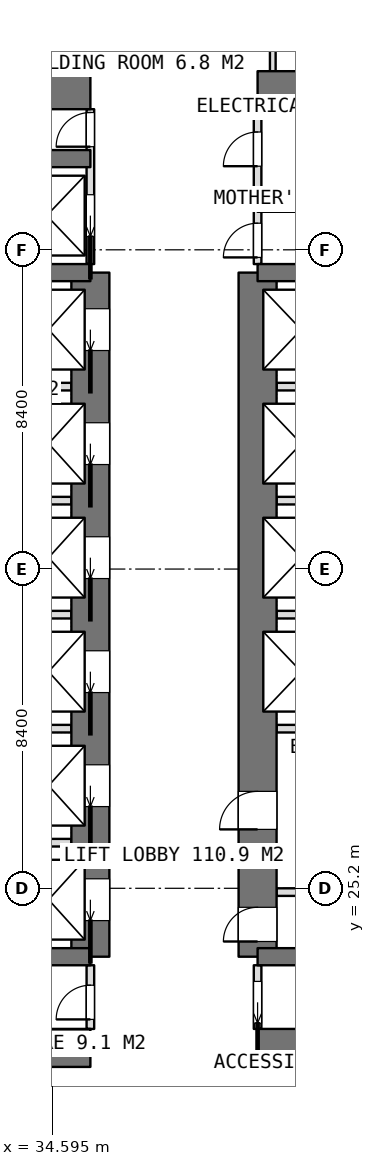
"""IFC4 building model, lengths in metres.
Left out: names, types, materials, properties, quantities, classifications, styles, units other than length and angle.
Written with IfcOpenShell. Run it as: python <this file> out.ifc"""

import sys

from ifc_helpers import new_model, si_unit, direction, frame, frame_2d, origin, place, context, subcontext, project, spatial, rectangle, extrude, element, fill, save


model = new_model("IFC4")
c1 = context("Model", 3, precision=1e-05, world=origin(), true_north=direction((0.0, 1.0)))
c2 = subcontext(c1, "Body", "Model", "MODEL_VIEW")
j1 = project(units=[si_unit("LENGTHUNIT", "METRE"), si_unit("PLANEANGLEUNIT", "RADIAN")], contexts=[c1])
p1 = place(None, origin())
s1 = spatial("IfcSite", under=j1, at=p1, CompositionType="ELEMENT")
p2 = place(p1, origin())
s2 = spatial("IfcBuilding", under=s1, at=p2, CompositionType="ELEMENT")
p3 = place(p2, frame((0.0, 0.0, 151.55)))
s3 = spatial("IfcBuildingStorey", under=s2, at=p3, CompositionType="ELEMENT", Elevation=151.55)
p4 = place(p3, frame((25.2, 21.0, 0.0), z_axis=(0.0, 0.0, 1.0), x_axis=(1.0, 0.0, 0.0)))
e1 = element("IfcWall", 1, at=p4, inside=s3, PredefinedType="SHEAR", context=c2, shape_type="SweptSolid", body=[
    extrude(rectangle(XDim=10.4, YDim=1.0, at=frame_2d((5.2, 0.0))), origin(), (0.0, 0.0, 1.0), 3.75),
])
p5 = place(p3, frame((40.0, 21.0, 0.0), z_axis=(0.0, 0.0, 1.0), x_axis=(1.0, 0.0, 0.0)))
e2 = element("IfcWall", 2, at=p5, inside=s3, PredefinedType="SHEAR", context=c2, shape_type="SweptSolid", body=[
    extrude(rectangle(XDim=10.4, YDim=1.0, at=frame_2d((5.2, 0.0))), origin(), (0.0, 0.0, 1.0), 3.75),
])
p6 = place(p3, frame((25.2, 46.2, 0.0), z_axis=(0.0, 0.0, 1.0), x_axis=(1.0, 0.0, 0.0)))
e3 = element("IfcWall", 3, at=p6, inside=s3, PredefinedType="SHEAR", context=c2, shape_type="SweptSolid", body=[
    extrude(rectangle(XDim=10.4, YDim=1.0, at=frame_2d((5.2, 0.0))), origin(), (0.0, 0.0, 1.0), 3.75),
])
p7 = place(p3, frame((40.0, 46.2, 0.0), z_axis=(0.0, 0.0, 1.0), x_axis=(1.0, 0.0, 0.0)))
e4 = element("IfcWall", 4, at=p7, inside=s3, PredefinedType="SHEAR", context=c2, shape_type="SweptSolid", body=[
    extrude(rectangle(XDim=10.4, YDim=1.0, at=frame_2d((5.2, 0.0))), origin(), (0.0, 0.0, 1.0), 3.75),
])
p8 = place(p3, frame((35.6, 23.4, 0.0), z_axis=(0.0, 0.0, 1.0), x_axis=(0.0, 1.0, 0.0)))
e5 = element("IfcWall", 5, at=p8, inside=s3, PredefinedType="SHEAR", context=c2, shape_type="SweptSolid", body=[
    extrude(rectangle(XDim=18.0, YDim=1.0, at=frame_2d((9.0, 0.0))), origin(), (0.0, 0.0, 1.0), 3.75),
])
p9 = place(p8, frame((0.95, 0.0, 0.0)))
e6 = element("IfcOpeningElement", 6, at=p9, cuts=e5, PredefinedType="OPENING", context=c2, shape_type="SweptSolid", body=[
    extrude(rectangle(XDim=1.1, YDim=2.1, at=frame_2d((0.55, 1.05))), frame((0.0, 0.51, 0.0), z_axis=(0.0, -1.0, 0.0), x_axis=(1.0, 0.0, 0.0)), (0.0, 0.0, 1.0), 1.02),
])
p10 = place(p8, frame((3.95, 0.0, 0.0)))
e7 = element("IfcOpeningElement", 7, at=p10, cuts=e5, PredefinedType="OPENING", context=c2, shape_type="SweptSolid", body=[
    extrude(rectangle(XDim=1.1, YDim=2.1, at=frame_2d((0.55, 1.05))), frame((0.0, 0.51, 0.0), z_axis=(0.0, -1.0, 0.0), x_axis=(1.0, 0.0, 0.0)), (0.0, 0.0, 1.0), 1.02),
])
p11 = place(p8, frame((6.95, 0.0, 0.0)))
e8 = element("IfcOpeningElement", 8, at=p11, cuts=e5, PredefinedType="OPENING", context=c2, shape_type="SweptSolid", body=[
    extrude(rectangle(XDim=1.1, YDim=2.1, at=frame_2d((0.55, 1.05))), frame((0.0, 0.51, 0.0), z_axis=(0.0, -1.0, 0.0), x_axis=(1.0, 0.0, 0.0)), (0.0, 0.0, 1.0), 1.02),
])
p12 = place(p8, frame((9.95, 0.0, 0.0)))
e9 = element("IfcOpeningElement", 9, at=p12, cuts=e5, PredefinedType="OPENING", context=c2, shape_type="SweptSolid", body=[
    extrude(rectangle(XDim=1.1, YDim=2.1, at=frame_2d((0.55, 1.05))), frame((0.0, 0.51, 0.0), z_axis=(0.0, -1.0, 0.0), x_axis=(1.0, 0.0, 0.0)), (0.0, 0.0, 1.0), 1.02),
])
p13 = place(p8, frame((12.95, 0.0, 0.0)))
e10 = element("IfcOpeningElement", 10, at=p13, cuts=e5, PredefinedType="OPENING", context=c2, shape_type="SweptSolid", body=[
    extrude(rectangle(XDim=1.1, YDim=2.1, at=frame_2d((0.55, 1.05))), frame((0.0, 0.51, 0.0), z_axis=(0.0, -1.0, 0.0), x_axis=(1.0, 0.0, 0.0)), (0.0, 0.0, 1.0), 1.02),
])
p14 = place(p8, frame((15.95, 0.0, 0.0)))
e11 = element("IfcOpeningElement", 11, at=p14, cuts=e5, PredefinedType="OPENING", context=c2, shape_type="SweptSolid", body=[
    extrude(rectangle(XDim=1.1, YDim=2.1, at=frame_2d((0.55, 1.05))), frame((0.0, 0.51, 0.0), z_axis=(0.0, -1.0, 0.0), x_axis=(1.0, 0.0, 0.0)), (0.0, 0.0, 1.0), 1.02),
])
p15 = place(p3, frame((40.0, 23.4, 0.0), z_axis=(0.0, 0.0, 1.0), x_axis=(0.0, 1.0, 0.0)))
e12 = element("IfcWall", 12, at=p15, inside=s3, PredefinedType="SHEAR", context=c2, shape_type="SweptSolid", body=[
    extrude(rectangle(XDim=18.0, YDim=1.0, at=frame_2d((9.0, 0.0))), origin(), (0.0, 0.0, 1.0), 3.75),
])
p16 = place(p15, frame((0.4, 0.0, 0.0)))
e13 = element("IfcOpeningElement", 13, at=p16, cuts=e12, PredefinedType="OPENING", context=c2, shape_type="SweptSolid", body=[
    extrude(rectangle(XDim=0.9, YDim=2.1, at=frame_2d((0.45, 1.05))), frame((0.0, 0.51, 0.0), z_axis=(0.0, -1.0, 0.0), x_axis=(1.0, 0.0, 0.0)), (0.0, 0.0, 1.0), 1.02),
])
p17 = place(p15, frame((3.35, 0.0, 0.0)))
e14 = element("IfcOpeningElement", 14, at=p17, cuts=e12, PredefinedType="OPENING", context=c2, shape_type="SweptSolid", body=[
    extrude(rectangle(XDim=1.0, YDim=2.1, at=frame_2d((0.5, 1.05))), frame((0.0, 0.51, 0.0), z_axis=(0.0, -1.0, 0.0), x_axis=(1.0, 0.0, 0.0)), (0.0, 0.0, 1.0), 1.02),
])
for number, where, z_axis, x_axis in (
    (15, (31.8, 23.4, 0.0), (0.0, 0.0, 1.0), (1.0, 0.0, 0.0)),
    (16, (31.8, 41.4, 0.0), (0.0, 0.0, 1.0), (1.0, 0.0, 0.0)),
    (17, (31.8, 44.4, 0.0), (0.0, 0.0, 1.0), (1.0, 0.0, 0.0)),
    (18, (40.0, 23.4, 0.0), (0.0, 0.0, 1.0), (1.0, 0.0, 0.0)),
    (19, (40.0, 41.4, 0.0), (0.0, 0.0, 1.0), (1.0, 0.0, 0.0)),
):
    element("IfcWall", number, at=place(p3, frame(where, z_axis=z_axis, x_axis=x_axis)), inside=s3, PredefinedType="SHEAR", context=c2, shape_type="SweptSolid", body=[
        extrude(rectangle(XDim=3.8, YDim=0.45, at=frame_2d((1.9, 0.0))), origin(), (0.0, 0.0, 1.0), 3.75),
    ])
for number, where, z_axis, x_axis in (
    (20, (32.025, 26.4, 0.0), (0.0, 0.0, 1.0), (1.0, 0.0, 0.0)),
    (21, (32.025, 29.4, 0.0), (0.0, 0.0, 1.0), (1.0, 0.0, 0.0)),
    (22, (32.025, 32.4, 0.0), (0.0, 0.0, 1.0), (1.0, 0.0, 0.0)),
    (23, (32.025, 35.4, 0.0), (0.0, 0.0, 1.0), (1.0, 0.0, 0.0)),
    (24, (32.025, 38.4, 0.0), (0.0, 0.0, 1.0), (1.0, 0.0, 0.0)),
):
    element("IfcWall", number, at=place(p3, frame(where, z_axis=z_axis, x_axis=x_axis)), inside=s3, PredefinedType="PARTITIONING", context=c2, shape_type="SweptSolid", body=[
        extrude(rectangle(XDim=3.075, YDim=0.2, at=frame_2d((1.538, 0.0))), origin(), (0.0, 0.0, 1.0), 3.5),
    ])
for number, where, z_axis, x_axis in (
    (25, (40.5, 29.4, 0.0), (0.0, 0.0, 1.0), (1.0, 0.0, 0.0)),
    (26, (40.5, 32.4, 0.0), (0.0, 0.0, 1.0), (1.0, 0.0, 0.0)),
    (27, (40.5, 35.4, 0.0), (0.0, 0.0, 1.0), (1.0, 0.0, 0.0)),
    (28, (40.5, 38.4, 0.0), (0.0, 0.0, 1.0), (1.0, 0.0, 0.0)),
):
    element("IfcWall", number, at=place(p3, frame(where, z_axis=z_axis, x_axis=x_axis)), inside=s3, PredefinedType="PARTITIONING", context=c2, shape_type="SweptSolid", body=[
        extrude(rectangle(XDim=3.075, YDim=0.2, at=frame_2d((1.538, 0.0))), origin(), (0.0, 0.0, 1.0), 3.5),
    ])
p18 = place(p3, frame((40.0, 21.5, 0.0), z_axis=(0.0, 0.0, 1.0), x_axis=(0.0, 1.0, 0.0)))
e29 = element("IfcWall", 29, at=p18, inside=s3, PredefinedType="PARTITIONING", context=c2, shape_type="SweptSolid", body=[
    extrude(rectangle(XDim=1.675, YDim=0.2, at=frame_2d((0.837, 0.0))), origin(), (0.0, 0.0, 1.0), 3.5),
])
p19 = place(p18, frame((0.15, 0.0, 0.0)))
e30 = element("IfcOpeningElement", 30, at=p19, cuts=e29, PredefinedType="OPENING", context=c2, shape_type="SweptSolid", body=[
    extrude(rectangle(XDim=1.1, YDim=2.1, at=frame_2d((0.55, 1.05))), frame((0.0, 0.11, 0.0), z_axis=(0.0, -1.0, 0.0), x_axis=(1.0, 0.0, 0.0)), (0.0, 0.0, 1.0), 0.22),
])
p20 = place(p3, frame((40.0, 41.625, 0.0), z_axis=(0.0, 0.0, 1.0), x_axis=(0.0, 1.0, 0.0)))
e31 = element("IfcWall", 31, at=p20, inside=s3, PredefinedType="PARTITIONING", context=c2, shape_type="SweptSolid", body=[
    extrude(rectangle(XDim=4.075, YDim=0.2, at=frame_2d((2.038, 0.0))), origin(), (0.0, 0.0, 1.0), 3.5),
])
p21 = place(p20, frame((2.575, 0.0, 0.0)))
e32 = element("IfcOpeningElement", 32, at=p21, cuts=e31, PredefinedType="OPENING", context=c2, shape_type="SweptSolid", body=[
    extrude(rectangle(XDim=0.9, YDim=2.1, at=frame_2d((0.45, 1.05))), frame((0.0, 0.11, 0.0), z_axis=(0.0, -1.0, 0.0), x_axis=(1.0, 0.0, 0.0)), (0.0, 0.0, 1.0), 0.22),
])
p22 = place(p20, frame((0.175, 0.0, 0.0)))
e33 = element("IfcOpeningElement", 33, at=p22, cuts=e31, PredefinedType="OPENING", context=c2, shape_type="SweptSolid", body=[
    extrude(rectangle(XDim=0.9, YDim=2.1, at=frame_2d((0.45, 1.05))), frame((0.0, 0.11, 0.0), z_axis=(0.0, -1.0, 0.0), x_axis=(1.0, 0.0, 0.0)), (0.0, 0.0, 1.0), 0.22),
])
p23 = place(p3, frame((35.6, 41.625, 0.0), z_axis=(0.0, 0.0, 1.0), x_axis=(0.0, 1.0, 0.0)))
e34 = element("IfcWall", 34, at=p23, inside=s3, PredefinedType="PARTITIONING", context=c2, shape_type="SweptSolid", body=[
    extrude(rectangle(XDim=4.075, YDim=0.2, at=frame_2d((2.038, 0.0))), origin(), (0.0, 0.0, 1.0), 3.5),
])
p24 = place(p23, frame((3.088, 0.0, 0.0)))
e35 = element("IfcOpeningElement", 35, at=p24, cuts=e34, PredefinedType="OPENING", context=c2, shape_type="SweptSolid", body=[
    extrude(rectangle(XDim=0.9, YDim=2.1, at=frame_2d((0.45, 1.05))), frame((0.0, 0.11, 0.0), z_axis=(0.0, -1.0, 0.0), x_axis=(1.0, 0.0, 0.0)), (0.0, 0.0, 1.0), 0.22),
])
p25 = place(p23, frame((0.725, 0.0, 0.0)))
e36 = element("IfcOpeningElement", 36, at=p25, cuts=e34, PredefinedType="OPENING", context=c2, shape_type="SweptSolid", body=[
    extrude(rectangle(XDim=1.1, YDim=2.1, at=frame_2d((0.55, 1.05))), frame((0.0, 0.11, 0.0), z_axis=(0.0, -1.0, 0.0), x_axis=(1.0, 0.0, 0.0)), (0.0, 0.0, 1.0), 0.22),
])
p26 = place(p3, frame((35.6, 21.5, 0.0), z_axis=(0.0, 0.0, 1.0), x_axis=(0.0, 1.0, 0.0)))
e37 = element("IfcWall", 37, at=p26, inside=s3, PredefinedType="PARTITIONING", context=c2, shape_type="SweptSolid", body=[
    extrude(rectangle(XDim=1.675, YDim=0.2, at=frame_2d((0.837, 0.0))), origin(), (0.0, 0.0, 1.0), 3.5),
])
p27 = place(p26, frame((0.25, 0.0, 0.0)))
e38 = element("IfcOpeningElement", 38, at=p27, cuts=e37, PredefinedType="OPENING", context=c2, shape_type="SweptSolid", body=[
    extrude(rectangle(XDim=0.9, YDim=2.1, at=frame_2d((0.45, 1.05))), frame((0.0, 0.11, 0.0), z_axis=(0.0, -1.0, 0.0), x_axis=(1.0, 0.0, 0.0)), (0.0, 0.0, 1.0), 0.22),
])
p28 = place(p3, frame((40.5, 25.1, 0.0), z_axis=(0.0, 0.0, 1.0), x_axis=(1.0, 0.0, 0.0)))
e39 = element("IfcWall", 39, at=p28, inside=s3, PredefinedType="PARTITIONING", context=c2, shape_type="SweptSolid", body=[
    extrude(rectangle(XDim=3.075, YDim=0.2, at=frame_2d((1.538, 0.0))), origin(), (0.0, 0.0, 1.0), 3.5),
])
p29 = place(p3, frame((40.0, 43.1, 0.0), z_axis=(0.0, 0.0, 1.0), x_axis=(1.0, 0.0, 0.0)))
e40 = element("IfcWall", 40, at=p29, inside=s3, PredefinedType="PARTITIONING", context=c2, shape_type="SweptSolid", body=[
    extrude(rectangle(XDim=3.575, YDim=0.2, at=frame_2d((1.788, 0.0))), origin(), (0.0, 0.0, 1.0), 3.5),
])
for number, where, z_axis, x_axis in (
    (41, (40.4, 46.7, 0.0), (0.0, 0.0, 1.0), (0.0, 1.0, 0.0)),
    (42, (35.2, 46.7, 0.0), (0.0, 0.0, 1.0), (0.0, 1.0, 0.0)),
):
    element("IfcWall", number, at=place(p3, frame(where, z_axis=z_axis, x_axis=x_axis)), inside=s3, PredefinedType="PARTITIONING", context=c2, shape_type="SweptSolid", body=[
        extrude(rectangle(XDim=2.625, YDim=0.15, at=frame_2d((1.312, 0.0))), origin(), (0.0, 0.0, 1.0), 3.5),
    ])
p30 = place(p19, origin())
e43 = element("IfcDoor", 43, at=p30, inside=s3, OperationType="SLIDING_TO_LEFT", PredefinedType="DOOR", context=c2, shape_type="SweptSolid", body=[
    extrude(rectangle(XDim=1.1, YDim=2.1, at=frame_2d((0.55, 1.05))), frame((0.0, 0.025, 0.0), z_axis=(0.0, -1.0, 0.0), x_axis=(1.0, 0.0, 0.0)), (0.0, 0.0, 1.0), 0.05),
])
fill(e30, e43)
p31 = place(p27, origin())
e44 = element("IfcDoor", 44, at=p31, inside=s3, OperationType="SINGLE_SWING_LEFT", PredefinedType="DOOR", context=c2, shape_type="SweptSolid", body=[
    extrude(rectangle(XDim=0.9, YDim=2.1, at=frame_2d((0.45, 1.05))), frame((0.0, 0.025, 0.0), z_axis=(0.0, -1.0, 0.0), x_axis=(1.0, 0.0, 0.0)), (0.0, 0.0, 1.0), 0.05),
])
fill(e38, e44)
p32 = place(p21, origin())
e45 = element("IfcDoor", 45, at=p32, inside=s3, OperationType="SINGLE_SWING_LEFT", PredefinedType="DOOR", context=c2, shape_type="SweptSolid", body=[
    extrude(rectangle(XDim=0.9, YDim=2.1, at=frame_2d((0.45, 1.05))), frame((0.0, 0.025, 0.0), z_axis=(0.0, -1.0, 0.0), x_axis=(1.0, 0.0, 0.0)), (0.0, 0.0, 1.0), 0.05),
])
fill(e32, e45)
p33 = place(p22, origin())
e46 = element("IfcDoor", 46, at=p33, inside=s3, OperationType="SINGLE_SWING_LEFT", PredefinedType="DOOR", context=c2, shape_type="SweptSolid", body=[
    extrude(rectangle(XDim=0.9, YDim=2.1, at=frame_2d((0.45, 1.05))), frame((0.0, 0.025, 0.0), z_axis=(0.0, -1.0, 0.0), x_axis=(1.0, 0.0, 0.0)), (0.0, 0.0, 1.0), 0.05),
])
fill(e33, e46)
p34 = place(p16, origin())
e47 = element("IfcDoor", 47, at=p34, inside=s3, OperationType="SINGLE_SWING_LEFT", PredefinedType="DOOR", context=c2, shape_type="SweptSolid", body=[
    extrude(rectangle(XDim=0.9, YDim=2.1, at=frame_2d((0.45, 1.05))), frame((0.0, 0.025, 0.0), z_axis=(0.0, -1.0, 0.0), x_axis=(1.0, 0.0, 0.0)), (0.0, 0.0, 1.0), 0.05),
])
fill(e13, e47)
p35 = place(p17, origin())
e48 = element("IfcDoor", 48, at=p35, inside=s3, OperationType="SINGLE_SWING_LEFT", PredefinedType="DOOR", context=c2, shape_type="SweptSolid", body=[
    extrude(rectangle(XDim=1.0, YDim=2.1, at=frame_2d((0.5, 1.05))), frame((0.0, 0.025, 0.0), z_axis=(0.0, -1.0, 0.0), x_axis=(1.0, 0.0, 0.0)), (0.0, 0.0, 1.0), 0.05),
])
fill(e14, e48)
p36 = place(p24, origin())
e49 = element("IfcDoor", 49, at=p36, inside=s3, OperationType="SINGLE_SWING_LEFT", PredefinedType="DOOR", context=c2, shape_type="SweptSolid", body=[
    extrude(rectangle(XDim=0.9, YDim=2.1, at=frame_2d((0.45, 1.05))), frame((0.0, 0.025, 0.0), z_axis=(0.0, -1.0, 0.0), x_axis=(1.0, 0.0, 0.0)), (0.0, 0.0, 1.0), 0.05),
])
fill(e35, e49)
p37 = place(p9, origin())
e50 = element("IfcDoor", 50, at=p37, inside=s3, OperationType="SLIDING_TO_LEFT", PredefinedType="USERDEFINED", context=c2, shape_type="SweptSolid", body=[
    extrude(rectangle(XDim=1.1, YDim=2.1, at=frame_2d((0.55, 1.05))), frame((0.0, 0.025, 0.0), z_axis=(0.0, -1.0, 0.0), x_axis=(1.0, 0.0, 0.0)), (0.0, 0.0, 1.0), 0.05),
])
fill(e6, e50)
p38 = place(p10, origin())
e51 = element("IfcDoor", 51, at=p38, inside=s3, OperationType="SLIDING_TO_LEFT", PredefinedType="USERDEFINED", context=c2, shape_type="SweptSolid", body=[
    extrude(rectangle(XDim=1.1, YDim=2.1, at=frame_2d((0.55, 1.05))), frame((0.0, 0.025, 0.0), z_axis=(0.0, -1.0, 0.0), x_axis=(1.0, 0.0, 0.0)), (0.0, 0.0, 1.0), 0.05),
])
fill(e7, e51)
p39 = place(p11, origin())
e52 = element("IfcDoor", 52, at=p39, inside=s3, OperationType="SLIDING_TO_LEFT", PredefinedType="USERDEFINED", context=c2, shape_type="SweptSolid", body=[
    extrude(rectangle(XDim=1.1, YDim=2.1, at=frame_2d((0.55, 1.05))), frame((0.0, 0.025, 0.0), z_axis=(0.0, -1.0, 0.0), x_axis=(1.0, 0.0, 0.0)), (0.0, 0.0, 1.0), 0.05),
])
fill(e8, e52)
p40 = place(p12, origin())
e53 = element("IfcDoor", 53, at=p40, inside=s3, OperationType="SLIDING_TO_LEFT", PredefinedType="USERDEFINED", context=c2, shape_type="SweptSolid", body=[
    extrude(rectangle(XDim=1.1, YDim=2.1, at=frame_2d((0.55, 1.05))), frame((0.0, 0.025, 0.0), z_axis=(0.0, -1.0, 0.0), x_axis=(1.0, 0.0, 0.0)), (0.0, 0.0, 1.0), 0.05),
])
fill(e9, e53)
p41 = place(p13, origin())
e54 = element("IfcDoor", 54, at=p41, inside=s3, OperationType="SLIDING_TO_LEFT", PredefinedType="USERDEFINED", context=c2, shape_type="SweptSolid", body=[
    extrude(rectangle(XDim=1.1, YDim=2.1, at=frame_2d((0.55, 1.05))), frame((0.0, 0.025, 0.0), z_axis=(0.0, -1.0, 0.0), x_axis=(1.0, 0.0, 0.0)), (0.0, 0.0, 1.0), 0.05),
])
fill(e10, e54)
p42 = place(p14, origin())
e55 = element("IfcDoor", 55, at=p42, inside=s3, OperationType="SLIDING_TO_LEFT", PredefinedType="USERDEFINED", context=c2, shape_type="SweptSolid", body=[
    extrude(rectangle(XDim=1.1, YDim=2.1, at=frame_2d((0.55, 1.05))), frame((0.0, 0.025, 0.0), z_axis=(0.0, -1.0, 0.0), x_axis=(1.0, 0.0, 0.0)), (0.0, 0.0, 1.0), 0.05),
])
fill(e11, e55)
p43 = place(p25, origin())
e56 = element("IfcDoor", 56, at=p43, inside=s3, OperationType="SLIDING_TO_LEFT", PredefinedType="USERDEFINED", context=c2, shape_type="SweptSolid", body=[
    extrude(rectangle(XDim=1.1, YDim=2.1, at=frame_2d((0.55, 1.05))), frame((0.0, 0.025, 0.0), z_axis=(0.0, -1.0, 0.0), x_axis=(1.0, 0.0, 0.0)), (0.0, 0.0, 1.0), 0.05),
])
fill(e36, e56)
save(model, sys.argv[1])
